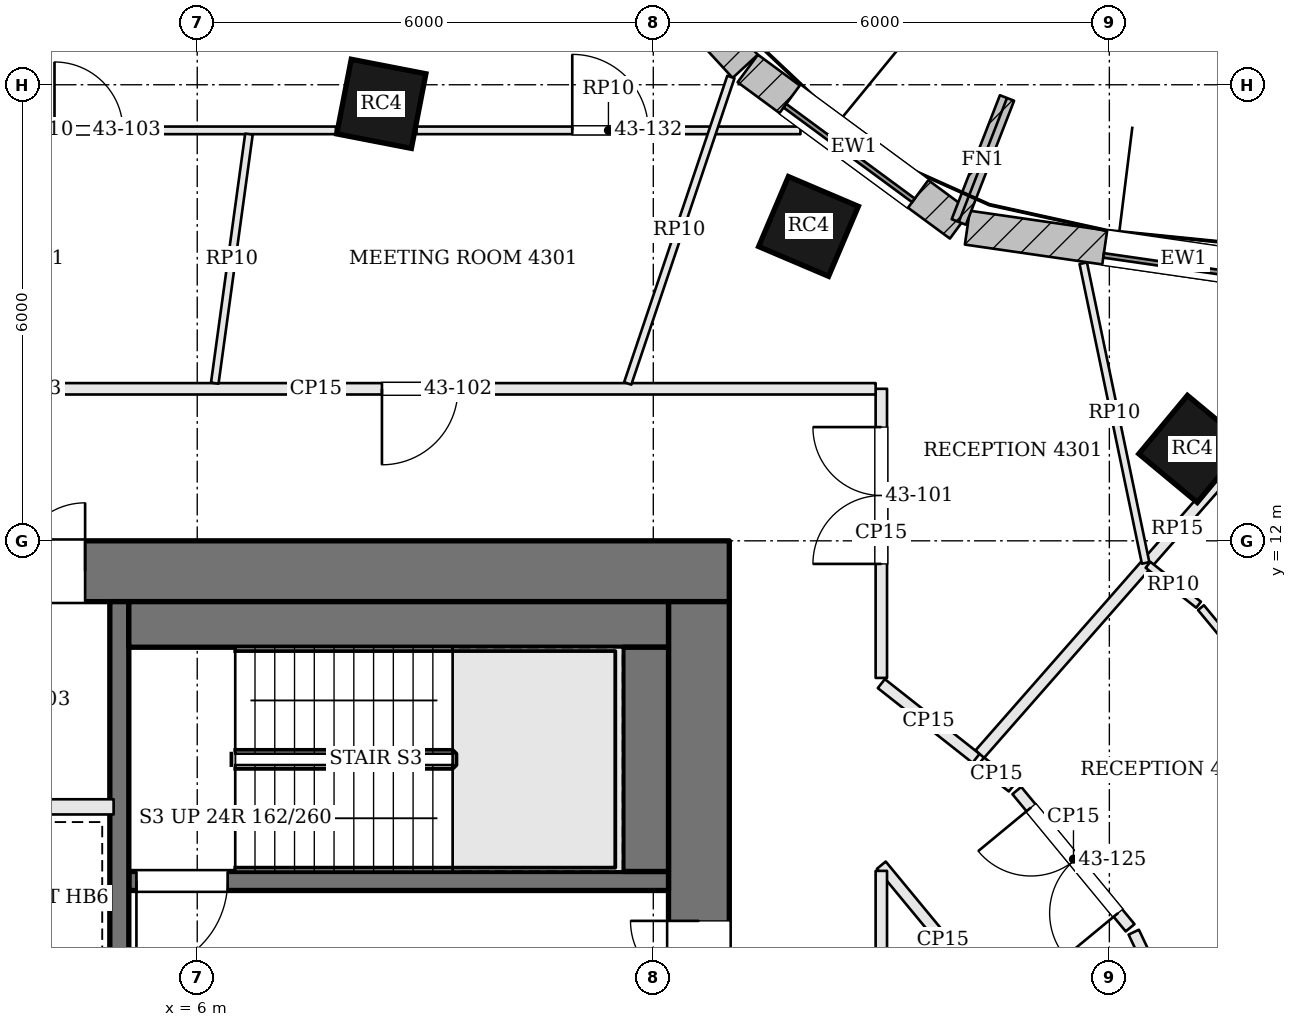
"""IFC4 building model, lengths in metres.
Left out: names, types, materials, properties, quantities, classifications, styles, units other than length and angle.
Written with IfcOpenShell. Run it as: python <this file> out.ifc"""

import sys

from ifc_helpers import new_model, si_unit, direction, frame, frame_2d, origin, origin_2d, place, context, subcontext, project, spatial, rectangle, extrude, element, fill, save


model = new_model("IFC4")
c1 = context("Model", 3, precision=1e-05, world=origin(), true_north=direction((0.0, 1.0)))
c2 = subcontext(c1, "Body", "Model", "MODEL_VIEW")
j1 = project(units=[si_unit("LENGTHUNIT", "METRE"), si_unit("PLANEANGLEUNIT", "RADIAN")], contexts=[c1])
p1 = place(None, origin())
s1 = spatial("IfcSite", under=j1, at=p1, CompositionType="ELEMENT")
p2 = place(p1, origin())
s2 = spatial("IfcBuilding", under=s1, at=p2, CompositionType="ELEMENT")
p3 = place(p2, frame((0.0, 0.0, 177.9)))
s3 = spatial("IfcBuildingStorey", under=s2, at=p3, CompositionType="ELEMENT", Elevation=177.9)
p4 = place(p3, frame((-13.0, 11.6, 0.0), z_axis=(0.0, 0.0, 1.0), x_axis=(1.0, 0.0, 0.0)))
e1 = element("IfcWall", 1, at=p4, inside=s3, PredefinedType="SHEAR", context=c2, shape_type="SweptSolid", body=[
    extrude(rectangle(XDim=26.0, YDim=0.8, at=frame_2d((13.0, 0.0))), origin(), (0.0, 0.0, 1.0), 3.9),
])
p5 = place(p4, frame((9.375, 0.0, 0.0)))
e2 = element("IfcOpeningElement", 2, at=p5, cuts=e1, PredefinedType="OPENING", context=c2, shape_type="SweptSolid", body=[
    extrude(rectangle(XDim=0.7, YDim=2.1, at=frame_2d((0.35, 1.05))), frame((0.0, 0.41, 0.0), z_axis=(0.0, -1.0, 0.0), x_axis=(1.0, 0.0, 0.0)), (0.0, 0.0, 1.0), 0.82),
])
p6 = place(p4, frame((12.075, 0.0, 0.0)))
e3 = element("IfcOpeningElement", 3, at=p6, cuts=e1, PredefinedType="OPENING", context=c2, shape_type="SweptSolid", body=[
    extrude(rectangle(XDim=1.0, YDim=2.1, at=frame_2d((0.5, 1.05))), frame((0.0, 0.41, 0.0), z_axis=(0.0, -1.0, 0.0), x_axis=(1.0, 0.0, 0.0)), (0.0, 0.0, 1.0), 0.82),
])
p7 = place(p4, frame((14.675, 0.0, 0.0)))
e4 = element("IfcOpeningElement", 4, at=p7, cuts=e1, PredefinedType="OPENING", context=c2, shape_type="SweptSolid", body=[
    extrude(rectangle(XDim=0.7, YDim=2.1, at=frame_2d((0.35, 1.05))), frame((0.0, 0.41, 0.0), z_axis=(0.0, -1.0, 0.0), x_axis=(1.0, 0.0, 0.0)), (0.0, 0.0, 1.0), 0.82),
])
p8 = place(p4, frame((16.625, 0.0, 0.0)))
e5 = element("IfcOpeningElement", 5, at=p8, cuts=e1, PredefinedType="OPENING", context=c2, shape_type="SweptSolid", body=[
    extrude(rectangle(XDim=0.9, YDim=2.1, at=frame_2d((0.45, 1.05))), frame((0.0, 0.41, 0.0), z_axis=(0.0, -1.0, 0.0), x_axis=(1.0, 0.0, 0.0)), (0.0, 0.0, 1.0), 0.82),
])
p9 = place(p3, frame((12.6, -2.2, 0.0), z_axis=(0.0, 0.0, 1.0), x_axis=(0.0, 1.0, 0.0)))
e6 = element("IfcWall", 6, at=p9, inside=s3, PredefinedType="SHEAR", context=c2, shape_type="SweptSolid", body=[
    extrude(rectangle(XDim=13.4, YDim=0.8, at=frame_2d((6.7, 0.0))), origin(), (0.0, 0.0, 1.0), 3.9),
])
p10 = place(p9, frame((7.4, 0.0, 0.0)))
e7 = element("IfcOpeningElement", 7, at=p10, cuts=e6, PredefinedType="OPENING", context=c2, shape_type="SweptSolid", body=[
    extrude(rectangle(XDim=1.8, YDim=2.1, at=frame_2d((0.9, 1.05))), frame((0.0, 0.41, 0.0), z_axis=(0.0, -1.0, 0.0), x_axis=(1.0, 0.0, 0.0)), (0.0, 0.0, 1.0), 0.82),
])
for number, where, z_axis, x_axis in (
    (8, (19.092, 13.209, 0.0), (0.0, 0.0, 1.0), (-0.769, 0.639, 0.0)),
    (9, (14.042, 16.136, 0.0), (0.0, 0.0, 1.0), (-0.92, 0.392, 0.0)),
    (10, (8.422, 17.749, 0.0), (0.0, 0.0, 1.0), (-0.982, 0.191, 0.0)),
):
    element("IfcColumn", number, at=place(p3, frame(where, z_axis=z_axis, x_axis=x_axis)), inside=s3, PredefinedType="COLUMN", context=c2, shape_type="SweptSolid", body=[
        extrude(rectangle(XDim=1.0, YDim=1.0, at=origin_2d()), origin(), (0.0, 0.0, 1.0), 3.9),
    ])
p11 = place(p3, frame((21.825, 15.297, 0.0), z_axis=(0.0, 0.0, 1.0), x_axis=(-0.98971474215, 0.143054986527, 0.0)))
e11 = element("IfcWall", 11, at=p11, inside=s3, PredefinedType="SOLIDWALL", context=c2, shape_type="SweptSolid", body=[
    extrude(rectangle(XDim=5.753, YDim=0.45, at=frame_2d((2.876, 0.0))), origin(), (0.0, 0.0, 1.0), 3.7),
])
p12 = place(p11, frame((1.826, 0.0, 0.9)))
e12 = element("IfcOpeningElement", 12, at=p12, cuts=e11, PredefinedType="OPENING", context=c2, shape_type="SweptSolid", body=[
    extrude(rectangle(XDim=2.1, YDim=2.3, at=frame_2d((1.05, 1.15))), frame((0.0, 0.235, 0.0), z_axis=(0.0, -1.0, 0.0), x_axis=(1.0, 0.0, 0.0)), (0.0, 0.0, 1.0), 0.47),
])
p13 = place(p3, frame((16.036, 16.158, 0.0), z_axis=(0.0, 0.0, 1.0), x_axis=(-0.805181432967, 0.593028549064, 0.0)))
e13 = element("IfcWall", 13, at=p13, inside=s3, PredefinedType="SOLIDWALL", context=c2, shape_type="SweptSolid", body=[
    extrude(rectangle(XDim=3.469, YDim=0.45, at=frame_2d((1.734, 0.0))), origin(), (0.0, 0.0, 1.0), 3.7),
])
p14 = place(p13, frame((0.684, 0.0, 0.9)))
e14 = element("IfcOpeningElement", 14, at=p14, cuts=e13, PredefinedType="OPENING", context=c2, shape_type="SweptSolid", body=[
    extrude(rectangle(XDim=2.1, YDim=2.3, at=frame_2d((1.05, 1.15))), frame((0.0, 0.235, 0.0), z_axis=(0.0, -1.0, 0.0), x_axis=(1.0, 0.0, 0.0)), (0.0, 0.0, 1.0), 0.47),
])
p15 = place(p3, frame((13.209, 18.243, 0.0), z_axis=(0.0, 0.0, 1.0), x_axis=(-0.677612152497, 0.735419452278, 0.0)))
e15 = element("IfcWall", 15, at=p15, inside=s3, PredefinedType="SOLIDWALL", context=c2, shape_type="SweptSolid", body=[
    extrude(rectangle(XDim=3.797, YDim=0.45, at=frame_2d((1.898, 0.0))), origin(), (0.0, 0.0, 1.0), 3.7),
])
p16 = place(p15, frame((0.848, 0.0, 0.9)))
e16 = element("IfcOpeningElement", 16, at=p16, cuts=e15, PredefinedType="OPENING", context=c2, shape_type="SweptSolid", body=[
    extrude(rectangle(XDim=2.1, YDim=2.3, at=frame_2d((1.05, 1.15))), frame((0.0, 0.235, 0.0), z_axis=(0.0, -1.0, 0.0), x_axis=(1.0, 0.0, 0.0)), (0.0, 0.0, 1.0), 0.47),
])
p17 = place(p3, frame((16.019, 16.195, 0.0), z_axis=(0.0, 0.0, 1.0), x_axis=(0.362641522028, 0.931928713208, 0.0)))
e17 = element("IfcWall", 17, at=p17, inside=s3, PredefinedType="SOLIDWALL", context=c2, shape_type="SweptSolid", body=[
    extrude(rectangle(XDim=1.75, YDim=0.2, at=frame_2d((0.875, 0.0))), origin(), (0.0, 0.0, 1.0), 3.7),
])
p18 = place(p3, frame((12.2, 7.525, 0.0), z_axis=(0.0, 0.0, 1.0), x_axis=(-1.0, 0.0, 0.0)))
e18 = element("IfcWall", 18, at=p18, inside=s3, PredefinedType="SOLIDWALL", context=c2, shape_type="SweptSolid", body=[
    extrude(rectangle(XDim=7.1, YDim=0.25, at=frame_2d((3.55, 0.0))), origin(), (0.0, 0.0, 1.0), 3.7),
])
p19 = place(p18, frame((5.8, 0.0, 0.0)))
e19 = element("IfcOpeningElement", 19, at=p19, cuts=e18, PredefinedType="OPENING", context=c2, shape_type="SweptSolid", body=[
    extrude(rectangle(XDim=1.2, YDim=2.1, at=frame_2d((0.6, 1.05))), frame((0.0, 0.135, 0.0), z_axis=(0.0, -1.0, 0.0), x_axis=(1.0, 0.0, 0.0)), (0.0, 0.0, 1.0), 0.27),
])
p20 = place(p3, frame((4.975, 11.2, 0.0), z_axis=(0.0, 0.0, 1.0), x_axis=(0.0, -1.0, 0.0)))
e20 = element("IfcWall", 20, at=p20, inside=s3, PredefinedType="SOLIDWALL", context=c2, shape_type="SweptSolid", body=[
    extrude(rectangle(XDim=13.4, YDim=0.25, at=frame_2d((6.7, 0.0))), origin(), (0.0, 0.0, 1.0), 3.7),
])
p21 = place(p20, frame((5.25, 0.0, 0.0)))
e21 = element("IfcOpeningElement", 21, at=p21, cuts=e20, PredefinedType="OPENING", context=c2, shape_type="SweptSolid", body=[
    extrude(rectangle(XDim=1.2, YDim=2.1, at=frame_2d((0.6, 1.05))), frame((0.0, 0.135, 0.0), z_axis=(0.0, -1.0, 0.0), x_axis=(1.0, 0.0, 0.0)), (0.0, 0.0, 1.0), 0.27),
])
p22 = place(p3, frame((12.2, 10.9, 0.0), z_axis=(0.0, 0.0, 1.0), x_axis=(-1.0, 0.0, 0.0)))
e22 = element("IfcWall", 22, at=p22, inside=s3, PredefinedType="SOLIDWALL", context=c2, shape_type="SweptSolid", body=[
    extrude(rectangle(XDim=7.1, YDim=0.6, at=frame_2d((3.55, 0.0))), origin(), (0.0, 0.0, 1.0), 3.7),
])
p23 = place(p3, frame((11.9, 10.6, 0.0), z_axis=(0.0, 0.0, 1.0), x_axis=(0.0, -1.0, 0.0)))
e23 = element("IfcWall", 23, at=p23, inside=s3, PredefinedType="SOLIDWALL", context=c2, shape_type="SweptSolid", body=[
    extrude(rectangle(XDim=2.95, YDim=0.6, at=frame_2d((1.475, 0.0))), origin(), (0.0, 0.0, 1.0), 3.7),
])
p24 = place(p3, frame((-4.9, 8.5, 0.0), z_axis=(0.0, 0.0, 1.0), x_axis=(1.0, 0.0, 0.0)))
e24 = element("IfcWall", 24, at=p24, inside=s3, PredefinedType="SOLIDWALL", context=c2, shape_type="SweptSolid", body=[
    extrude(rectangle(XDim=9.8, YDim=0.2, at=frame_2d((4.9, 0.0))), origin(), (0.0, 0.0, 1.0), 3.7),
])
p25 = place(p3, frame((16.246, 9.138, 0.0), z_axis=(0.0, 0.0, 1.0), x_axis=(-0.785126783061, 0.619335074512, 0.0)))
e25 = element("IfcWall", 25, at=p25, inside=s3, PredefinedType="PARTITIONING", context=c2, shape_type="SweptSolid", body=[
    extrude(rectangle(XDim=1.587, YDim=0.15, at=frame_2d((0.794, 0.0))), origin(), (0.0, 0.0, 1.0), 3.084),
])
p26 = place(p3, frame((15.0, 10.196, 0.0), z_axis=(0.0, 0.0, 1.0), x_axis=(0.0, 1.0, 0.0)))
e26 = element("IfcWall", 26, at=p26, inside=s3, PredefinedType="PARTITIONING", context=c2, shape_type="SweptSolid", body=[
    extrude(rectangle(XDim=3.804, YDim=0.15, at=frame_2d((1.902, 0.0))), origin(), (0.0, 0.0, 1.0), 3.084),
])
p27 = place(p26, frame((1.5, 0.0, 0.0)))
e27 = element("IfcOpeningElement", 27, at=p27, cuts=e26, PredefinedType="OPENING", context=c2, shape_type="SweptSolid", body=[
    extrude(rectangle(XDim=1.8, YDim=2.1, at=frame_2d((0.9, 1.05))), frame((0.0, 0.085, 0.0), z_axis=(0.0, -1.0, 0.0), x_axis=(1.0, 0.0, 0.0)), (0.0, 0.0, 1.0), 0.17),
])
p28 = place(p3, frame((14.925, 14.0, 0.0), z_axis=(0.0, 0.0, 1.0), x_axis=(-1.0, 0.0, 0.0)))
e28 = element("IfcWall", 28, at=p28, inside=s3, PredefinedType="PARTITIONING", context=c2, shape_type="SweptSolid", body=[
    extrude(rectangle(XDim=14.725, YDim=0.15, at=frame_2d((7.362, 0.0))), origin(), (0.0, 0.0, 1.0), 3.084),
])
p29 = place(p28, frame((5.495, 0.0, 0.0)))
e29 = element("IfcOpeningElement", 29, at=p29, cuts=e28, PredefinedType="OPENING", context=c2, shape_type="SweptSolid", body=[
    extrude(rectangle(XDim=1.0, YDim=2.4, at=frame_2d((0.5, 1.2))), frame((0.0, 0.085, 0.0), z_axis=(0.0, -1.0, 0.0), x_axis=(1.0, 0.0, 0.0)), (0.0, 0.0, 1.0), 0.17),
])
p30 = place(p28, frame((11.15, 0.0, 0.0)))
e30 = element("IfcOpeningElement", 30, at=p30, cuts=e28, PredefinedType="OPENING", context=c2, shape_type="SweptSolid", body=[
    extrude(rectangle(XDim=1.0, YDim=2.1, at=frame_2d((0.5, 1.05))), frame((0.0, 0.085, 0.0), z_axis=(0.0, -1.0, 0.0), x_axis=(1.0, 0.0, 0.0)), (0.0, 0.0, 1.0), 0.17),
])
p31 = place(p3, frame((21.493, 15.114, 0.0), z_axis=(0.0, 0.0, 1.0), x_axis=(-0.659778549164, -0.751460089467, 0.0)))
e31 = element("IfcWall", 31, at=p31, inside=s3, PredefinedType="PARTITIONING", context=c2, shape_type="SweptSolid", body=[
    extrude(rectangle(XDim=7.877, YDim=0.15, at=frame_2d((3.938, 0.0))), origin(), (0.0, 0.0, 1.0), 3.234),
])
p32 = place(p3, frame((26.367, 8.789, 0.0), z_axis=(0.0, 0.0, 1.0), x_axis=(-0.913673557468, -0.406448804137, 0.0)))
e32 = element("IfcWall", 32, at=p32, inside=s3, PredefinedType="PARTITIONING", context=c2, shape_type="SweptSolid", body=[
    extrude(rectangle(XDim=8.029, YDim=0.15, at=frame_2d((4.014, 0.0))), origin(), (0.0, 0.0, 1.0), 3.234),
])
p33 = place(p3, frame((18.931, 5.563, 0.0), z_axis=(0.0, 0.0, 1.0), x_axis=(-0.428204145682, 0.903682029046, 0.0)))
e33 = element("IfcWall", 33, at=p33, inside=s3, PredefinedType="PARTITIONING", context=c2, shape_type="SweptSolid", body=[
    extrude(rectangle(XDim=1.425, YDim=0.15, at=frame_2d((0.713, 0.0))), origin(), (0.0, 0.0, 1.0), 3.084),
])
p34 = place(p3, frame((18.273, 6.909, 0.0), z_axis=(0.0, 0.0, 1.0), x_axis=(-0.63653648943, 0.771246586783, 0.0)))
e34 = element("IfcWall", 34, at=p34, inside=s3, PredefinedType="PARTITIONING", context=c2, shape_type="SweptSolid", body=[
    extrude(rectangle(XDim=2.342, YDim=0.15, at=frame_2d((1.171, 0.0))), origin(), (0.0, 0.0, 1.0), 3.084),
])
p35 = place(p34, frame((0.25, 0.0, 0.0)))
e35 = element("IfcOpeningElement", 35, at=p35, cuts=e34, PredefinedType="OPENING", context=c2, shape_type="SweptSolid", body=[
    extrude(rectangle(XDim=1.8, YDim=2.1, at=frame_2d((0.9, 1.05))), frame((0.0, 0.085, 0.0), z_axis=(0.0, -1.0, 0.0), x_axis=(1.0, 0.0, 0.0)), (0.0, 0.0, 1.0), 0.17),
])
p36 = place(p3, frame((16.724, 8.761, 0.0), z_axis=(0.0, 0.0, 1.0), x_axis=(-0.785093642841, 0.619377083827, 0.0)))
e36 = element("IfcWall", 36, at=p36, inside=s3, PredefinedType="PARTITIONING", context=c2, shape_type="SweptSolid", body=[
    extrude(rectangle(XDim=0.533, YDim=0.15, at=frame_2d((0.267, 0.0))), origin(), (0.0, 0.0, 1.0), 3.084),
])
p37 = place(p3, frame((15.0, 7.733, 0.0), z_axis=(0.0, 0.0, 1.0), x_axis=(0.636601263488, -0.771193121938, 0.0)))
e37 = element("IfcWall", 37, at=p37, inside=s3, PredefinedType="PARTITIONING", context=c2, shape_type="SweptSolid", body=[
    extrude(rectangle(XDim=2.545, YDim=0.15, at=frame_2d((1.272, 0.0))), origin(), (0.0, 0.0, 1.0), 3.084),
])
p38 = place(p3, frame((15.0, -4.925, 0.0), z_axis=(0.0, 0.0, 1.0), x_axis=(0.0, 1.0, 0.0)))
e38 = element("IfcWall", 38, at=p38, inside=s3, PredefinedType="PARTITIONING", context=c2, shape_type="SweptSolid", body=[
    extrude(rectangle(XDim=12.583, YDim=0.15, at=frame_2d((6.292, 0.0))), origin(), (0.0, 0.0, 1.0), 3.084),
])
p39 = place(p38, frame((6.441, 0.0, 0.0)))
e39 = element("IfcOpeningElement", 39, at=p39, cuts=e38, PredefinedType="OPENING", context=c2, shape_type="SweptSolid", body=[
    extrude(rectangle(XDim=0.7, YDim=2.1, at=frame_2d((0.35, 1.05))), frame((0.0, 0.085, 0.0), z_axis=(0.0, -1.0, 0.0), x_axis=(1.0, 0.0, 0.0)), (0.0, 0.0, 1.0), 0.17),
])
p40 = place(p3, frame((0.228, 17.4, 0.0), z_axis=(0.0, 0.0, 1.0), x_axis=(1.0, 0.0, 0.0)))
e40 = element("IfcWall", 40, at=p40, inside=s3, PredefinedType="PARTITIONING", context=c2, shape_type="SweptSolid", body=[
    extrude(rectangle(XDim=7.596, YDim=0.1, at=frame_2d((3.798, 0.0))), origin(), (0.0, 0.0, 1.0), 3.084),
])
p41 = place(p40, frame((3.894, 0.0, 0.0)))
e41 = element("IfcOpeningElement", 41, at=p41, cuts=e40, PredefinedType="OPENING", context=c2, shape_type="SweptSolid", body=[
    extrude(rectangle(XDim=0.9, YDim=2.1, at=frame_2d((0.45, 1.05))), frame((0.0, 0.06, 0.0), z_axis=(0.0, -1.0, 0.0), x_axis=(1.0, 0.0, 0.0)), (0.0, 0.0, 1.0), 0.12),
])
p42 = place(p3, frame((8.884, 17.4, 0.0), z_axis=(0.0, 0.0, 1.0), x_axis=(1.0, 0.0, 0.0)))
e42 = element("IfcWall", 42, at=p42, inside=s3, PredefinedType="PARTITIONING", context=c2, shape_type="SweptSolid", body=[
    extrude(rectangle(XDim=5.052, YDim=0.1, at=frame_2d((2.526, 0.0))), origin(), (0.0, 0.0, 1.0), 3.084),
])
p43 = place(p42, frame((2.05, 0.0, 0.0)))
e43 = element("IfcOpeningElement", 43, at=p43, cuts=e42, PredefinedType="OPENING", context=c2, shape_type="SweptSolid", body=[
    extrude(rectangle(XDim=1.0, YDim=2.4, at=frame_2d((0.5, 1.2))), frame((0.0, 0.06, 0.0), z_axis=(0.0, -1.0, 0.0), x_axis=(1.0, 0.0, 0.0)), (0.0, 0.0, 1.0), 0.12),
])
p44 = place(p3, frame((17.656, 15.652, 0.0), z_axis=(0.0, 0.0, 1.0), x_axis=(0.203733969948, -0.979026286414, 0.0)))
e44 = element("IfcWall", 44, at=p44, inside=s3, PredefinedType="PARTITIONING", context=c2, shape_type="SweptSolid", body=[
    extrude(rectangle(XDim=4.028, YDim=0.1, at=frame_2d((2.014, 0.0))), origin(), (0.0, 0.0, 1.0), 3.084),
])
p45 = place(p3, frame((11.664, 14.071, 0.0), z_axis=(0.0, 0.0, 1.0), x_axis=(0.319050122348, 0.947737843198, 0.0)))
e45 = element("IfcWall", 45, at=p45, inside=s3, PredefinedType="PARTITIONING", context=c2, shape_type="SweptSolid", body=[
    extrude(rectangle(XDim=4.254, YDim=0.1, at=frame_2d((2.127, 0.0))), origin(), (0.0, 0.0, 1.0), 3.084),
])
p46 = place(p3, frame((6.231, 14.074, 0.0), z_axis=(0.0, 0.0, 1.0), x_axis=(0.135982862237, 0.990711189589, 0.0)))
e46 = element("IfcWall", 46, at=p46, inside=s3, PredefinedType="PARTITIONING", context=c2, shape_type="SweptSolid", body=[
    extrude(rectangle(XDim=3.307, YDim=0.1, at=frame_2d((1.654, 0.0))), origin(), (0.0, 0.0, 1.0), 3.084),
])
p47 = place(p3, frame((18.508, 11.684, 0.0), z_axis=(0.0, 0.0, 1.0), x_axis=(0.785067093858, -0.619410734603, 0.0)))
e47 = element("IfcWall", 47, at=p47, inside=s3, PredefinedType="PARTITIONING", context=c2, shape_type="SweptSolid", body=[
    extrude(rectangle(XDim=0.847, YDim=0.1, at=frame_2d((0.424, 0.0))), origin(), (0.0, 0.0, 1.0), 3.084),
])
p48 = place(p3, frame((19.206, 11.121, 0.0), z_axis=(0.0, 0.0, 1.0), x_axis=(0.636597206989, -0.771196470462, 0.0)))
e48 = element("IfcWall", 48, at=p48, inside=s3, PredefinedType="PARTITIONING", context=c2, shape_type="SweptSolid", body=[
    extrude(rectangle(XDim=3.152, YDim=0.1, at=frame_2d((1.576, 0.0))), origin(), (0.0, 0.0, 1.0), 3.084),
])
p49 = place(p48, frame((1.619, 0.0, 0.0)))
e49 = element("IfcOpeningElement", 49, at=p49, cuts=e48, PredefinedType="OPENING", context=c2, shape_type="SweptSolid", body=[
    extrude(rectangle(XDim=1.0, YDim=2.1, at=frame_2d((0.5, 1.05))), frame((0.0, 0.06, 0.0), z_axis=(0.0, -1.0, 0.0), x_axis=(1.0, 0.0, 0.0)), (0.0, 0.0, 1.0), 0.12),
])
p50 = place(p12, origin())
e50 = element("IfcWindow", 50, at=p50, inside=s3, PartitioningType="SINGLE_PANEL", PredefinedType="WINDOW", context=c2, shape_type="SweptSolid", body=[
    extrude(rectangle(XDim=2.1, YDim=2.3, at=frame_2d((1.05, 1.15))), frame((0.0, 0.135, 0.0), z_axis=(0.0, -1.0, 0.0), x_axis=(1.0, 0.0, 0.0)), (0.0, 0.0, 1.0), 0.06),
])
fill(e12, e50)
p51 = place(p14, origin())
e51 = element("IfcWindow", 51, at=p51, inside=s3, PartitioningType="SINGLE_PANEL", PredefinedType="WINDOW", context=c2, shape_type="SweptSolid", body=[
    extrude(rectangle(XDim=2.1, YDim=2.3, at=frame_2d((1.05, 1.15))), frame((0.0, 0.135, 0.0), z_axis=(0.0, -1.0, 0.0), x_axis=(1.0, 0.0, 0.0)), (0.0, 0.0, 1.0), 0.06),
])
fill(e14, e51)
p52 = place(p10, origin())
e52 = element("IfcDoor", 52, at=p52, inside=s3, OperationType="DOUBLE_DOOR_SINGLE_SWING", PredefinedType="DOOR", context=c2, shape_type="SweptSolid", body=[
    extrude(rectangle(XDim=1.8, YDim=2.1, at=frame_2d((0.9, 1.05))), frame((0.0, 0.025, 0.0), z_axis=(0.0, -1.0, 0.0), x_axis=(1.0, 0.0, 0.0)), (0.0, 0.0, 1.0), 0.05),
])
fill(e7, e52)
p53 = place(p19, origin())
e53 = element("IfcDoor", 53, at=p53, inside=s3, OperationType="SINGLE_SWING_RIGHT", PredefinedType="DOOR", context=c2, shape_type="SweptSolid", body=[
    extrude(rectangle(XDim=1.2, YDim=2.1, at=frame_2d((0.6, 1.05))), frame((0.0, 0.025, 0.0), z_axis=(0.0, -1.0, 0.0), x_axis=(1.0, 0.0, 0.0)), (0.0, 0.0, 1.0), 0.05),
])
fill(e19, e53)
p54 = place(p8, origin())
e54 = element("IfcDoor", 54, at=p54, inside=s3, OperationType="SINGLE_SWING_RIGHT", PredefinedType="DOOR", context=c2, shape_type="SweptSolid", body=[
    extrude(rectangle(XDim=0.9, YDim=2.1, at=frame_2d((0.45, 1.05))), frame((0.0, 0.025, 0.0), z_axis=(0.0, -1.0, 0.0), x_axis=(1.0, 0.0, 0.0)), (0.0, 0.0, 1.0), 0.05),
])
fill(e5, e54)
p55 = place(p27, origin())
e55 = element("IfcDoor", 55, at=p55, inside=s3, OperationType="DOUBLE_DOOR_SINGLE_SWING", PredefinedType="DOOR", context=c2, shape_type="SweptSolid", body=[
    extrude(rectangle(XDim=1.8, YDim=2.1, at=frame_2d((0.9, 1.05))), frame((0.0, 0.025, 0.0), z_axis=(0.0, -1.0, 0.0), x_axis=(1.0, 0.0, 0.0)), (0.0, 0.0, 1.0), 0.05),
])
fill(e27, e55)
p56 = place(p29, origin())
e56 = element("IfcDoor", 56, at=p56, inside=s3, OperationType="SINGLE_SWING_RIGHT", PredefinedType="DOOR", context=c2, shape_type="SweptSolid", body=[
    extrude(rectangle(XDim=1.0, YDim=2.4, at=frame_2d((0.5, 1.2))), frame((0.0, 0.025, 0.0), z_axis=(0.0, -1.0, 0.0), x_axis=(1.0, 0.0, 0.0)), (0.0, 0.0, 1.0), 0.05),
])
fill(e29, e56)
p57 = place(p41, origin())
e57 = element("IfcDoor", 57, at=p57, inside=s3, OperationType="SINGLE_SWING_LEFT", PredefinedType="DOOR", context=c2, shape_type="SweptSolid", body=[
    extrude(rectangle(XDim=0.9, YDim=2.1, at=frame_2d((0.45, 1.05))), frame((0.0, 0.025, 0.0), z_axis=(0.0, -1.0, 0.0), x_axis=(1.0, 0.0, 0.0)), (0.0, 0.0, 1.0), 0.05),
])
fill(e41, e57)
p58 = place(p35, origin())
e58 = element("IfcDoor", 58, at=p58, inside=s3, OperationType="DOUBLE_DOOR_SINGLE_SWING", PredefinedType="DOOR", context=c2, shape_type="SweptSolid", body=[
    extrude(rectangle(XDim=1.8, YDim=2.1, at=frame_2d((0.9, 1.05))), frame((0.0, 0.025, 0.0), z_axis=(0.0, -1.0, 0.0), x_axis=(1.0, 0.0, 0.0)), (0.0, 0.0, 1.0), 0.05),
])
fill(e35, e58)
p59 = place(p43, origin())
e59 = element("IfcDoor", 59, at=p59, inside=s3, OperationType="SINGLE_SWING_LEFT", PredefinedType="DOOR", context=c2, shape_type="SweptSolid", body=[
    extrude(rectangle(XDim=1.0, YDim=2.4, at=frame_2d((0.5, 1.2))), frame((0.0, 0.025, 0.0), z_axis=(0.0, -1.0, 0.0), x_axis=(1.0, 0.0, 0.0)), (0.0, 0.0, 1.0), 0.05),
])
fill(e43, e59)
save(model, sys.argv[1])
